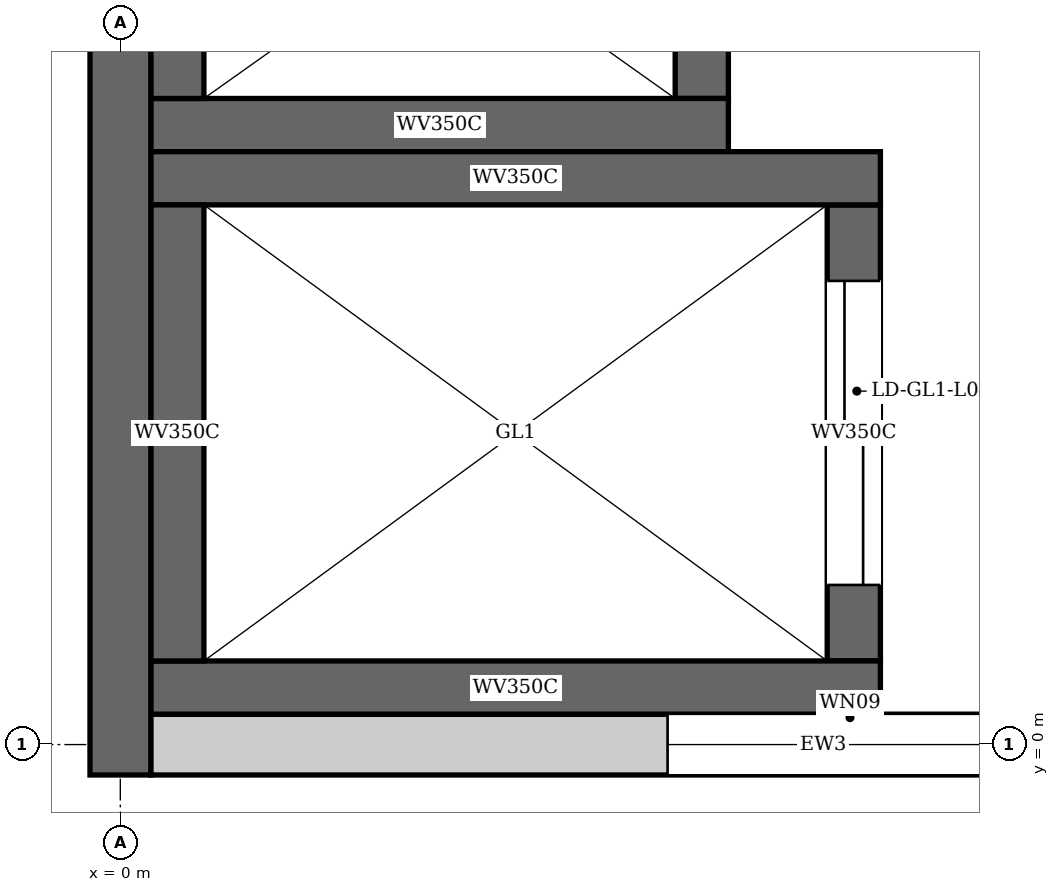
"""IFC4 building model, lengths in metres.
Left out: names, types, materials, properties, quantities, classifications, styles, units other than length and angle.
Written with IfcOpenShell. Run it as: python <this file> out.ifc"""

import sys

from ifc_helpers import new_model, si_unit, direction, frame, frame_2d, origin, place, context, subcontext, project, spatial, rectangle, extrude, element, fill, save


model = new_model("IFC4")
c1 = context("Model", 3, precision=1e-05, world=origin(), true_north=direction((0.0, 1.0)))
c2 = subcontext(c1, "Body", "Model", "MODEL_VIEW")
j1 = project(units=[si_unit("LENGTHUNIT", "METRE"), si_unit("PLANEANGLEUNIT", "RADIAN")], contexts=[c1])
p1 = place(None, origin())
s1 = spatial("IfcSite", under=j1, at=p1, CompositionType="ELEMENT")
p2 = place(p1, origin())
s2 = spatial("IfcBuilding", under=s1, at=p2, CompositionType="ELEMENT")
p3 = place(p2, frame((0.0, 0.0, 26.7)))
s3 = spatial("IfcBuildingStorey", under=s2, at=p3, CompositionType="ELEMENT", Elevation=26.7)
p4 = place(p3, frame((0.0, -0.2, 0.0), z_axis=(0.0, 0.0, 1.0), x_axis=(0.0, 1.0, 0.0)))
e1 = element("IfcWall", 1, at=p4, inside=s3, PredefinedType="SHEAR", context=c2, shape_type="SweptSolid", body=[
    extrude(rectangle(XDim=46.88, YDim=0.4, at=frame_2d((23.44, 0.0))), origin(), (0.0, 0.0, 1.0), 5.2),
])
for number, where, z_axis, x_axis in (
    (2, (0.2, 0.375, 0.0), (0.0, 0.0, 1.0), (1.0, 0.0, 0.0)),
    (3, (0.2, 3.725, 0.0), (0.0, 0.0, 1.0), (1.0, 0.0, 0.0)),
):
    element("IfcWall", number, at=place(p3, frame(where, z_axis=z_axis, x_axis=x_axis)), inside=s3, PredefinedType="SHEAR", context=c2, shape_type="SweptSolid", body=[
        extrude(rectangle(XDim=4.8, YDim=0.35, at=frame_2d((2.4, 0.0))), origin(), (0.0, 0.0, 1.0), 4.85),
    ])
p5 = place(p3, frame((0.375, 0.55, 0.0), z_axis=(0.0, 0.0, 1.0), x_axis=(0.0, 1.0, 0.0)))
e4 = element("IfcWall", 4, at=p5, inside=s3, PredefinedType="SHEAR", context=c2, shape_type="SweptSolid", body=[
    extrude(rectangle(XDim=3.0, YDim=0.35, at=frame_2d((1.5, 0.0))), origin(), (0.0, 0.0, 1.0), 4.85),
])
p6 = place(p3, frame((4.825, 0.55, 0.0), z_axis=(0.0, 0.0, 1.0), x_axis=(0.0, 1.0, 0.0)))
e5 = element("IfcWall", 5, at=p6, inside=s3, PredefinedType="SHEAR", context=c2, shape_type="SweptSolid", body=[
    extrude(rectangle(XDim=3.0, YDim=0.35, at=frame_2d((1.5, 0.0))), origin(), (0.0, 0.0, 1.0), 4.85),
])
p7 = place(p6, frame((0.5, 0.0, 0.0)))
e6 = element("IfcOpeningElement", 6, at=p7, cuts=e5, PredefinedType="OPENING", context=c2, shape_type="SweptSolid", body=[
    extrude(rectangle(XDim=2.0, YDim=2.4, at=frame_2d((1.0, 1.2))), frame((0.0, 0.185, 0.0), z_axis=(0.0, -1.0, 0.0), x_axis=(1.0, 0.0, 0.0)), (0.0, 0.0, 1.0), 0.37),
])
p8 = place(p3, frame((0.2, 4.075, 0.0), z_axis=(0.0, 0.0, 1.0), x_axis=(1.0, 0.0, 0.0)))
e7 = element("IfcWall", 7, at=p8, inside=s3, PredefinedType="SHEAR", context=c2, shape_type="SweptSolid", body=[
    extrude(rectangle(XDim=3.8, YDim=0.35, at=frame_2d((1.9, 0.0))), origin(), (0.0, 0.0, 1.0), 4.85),
])
p9 = place(p3, frame((0.375, 4.25, 0.0), z_axis=(0.0, 0.0, 1.0), x_axis=(0.0, 1.0, 0.0)))
e8 = element("IfcWall", 8, at=p9, inside=s3, PredefinedType="SHEAR", context=c2, shape_type="SweptSolid", body=[
    extrude(rectangle(XDim=2.2, YDim=0.35, at=frame_2d((1.1, 0.0))), origin(), (0.0, 0.0, 1.0), 4.85),
])
p10 = place(p3, frame((3.825, 4.25, 0.0), z_axis=(0.0, 0.0, 1.0), x_axis=(0.0, 1.0, 0.0)))
e9 = element("IfcWall", 9, at=p10, inside=s3, PredefinedType="SHEAR", context=c2, shape_type="SweptSolid", body=[
    extrude(rectangle(XDim=2.2, YDim=0.35, at=frame_2d((1.1, 0.0))), origin(), (0.0, 0.0, 1.0), 4.85),
])
p11 = place(p10, frame((0.55, 0.0, 0.0)))
e10 = element("IfcOpeningElement", 10, at=p11, cuts=e9, PredefinedType="OPENING", context=c2, shape_type="SweptSolid", body=[
    extrude(rectangle(XDim=1.1, YDim=2.1, at=frame_2d((0.55, 1.05))), frame((0.0, 0.185, 0.0), z_axis=(0.0, -1.0, 0.0), x_axis=(1.0, 0.0, 0.0)), (0.0, 0.0, 1.0), 0.37),
])
p12 = place(p3, frame((0.2, 0.0, 0.0), z_axis=(0.0, 0.0, 1.0), x_axis=(1.0, 0.0, 0.0)))
e11 = element("IfcWall", 11, at=p12, inside=s3, PredefinedType="ELEMENTEDWALL", context=c2, shape_type="SweptSolid", body=[
    extrude(rectangle(XDim=8.85, YDim=0.4, at=frame_2d((4.425, 0.0))), origin(), (0.0, 0.0, 1.0), 4.85),
])
p13 = place(p12, frame((3.4, 0.0, 1.0)))
e12 = element("IfcOpeningElement", 12, at=p13, cuts=e11, PredefinedType="OPENING", context=c2, shape_type="SweptSolid", body=[
    extrude(rectangle(XDim=2.4, YDim=2.2, at=frame_2d((1.2, 1.1))), frame((0.0, 0.21, 0.0), z_axis=(0.0, -1.0, 0.0), x_axis=(1.0, 0.0, 0.0)), (0.0, 0.0, 1.0), 0.42),
])
p14 = place(p13, origin())
e13 = element("IfcWindow", 13, at=p14, inside=s3, PartitioningType="SINGLE_PANEL", PredefinedType="WINDOW", context=c2, shape_type="SweptSolid", body=[
    extrude(rectangle(XDim=2.4, YDim=2.2, at=frame_2d((1.2, 1.1))), frame((0.0, 0.03, 0.0), z_axis=(0.0, -1.0, 0.0), x_axis=(1.0, 0.0, 0.0)), (0.0, 0.0, 1.0), 0.06),
])
fill(e12, e13)
p15 = place(p7, origin())
e14 = element("IfcDoor", 14, at=p15, inside=s3, OperationType="DOUBLE_DOOR_SLIDING", PredefinedType="DOOR", context=c2, shape_type="SweptSolid", body=[
    extrude(rectangle(XDim=2.0, YDim=2.4, at=frame_2d((1.0, 1.2))), frame((0.0, 0.025, 0.0), z_axis=(0.0, -1.0, 0.0), x_axis=(1.0, 0.0, 0.0)), (0.0, 0.0, 1.0), 0.05),
])
fill(e6, e14)
save(model, sys.argv[1])
